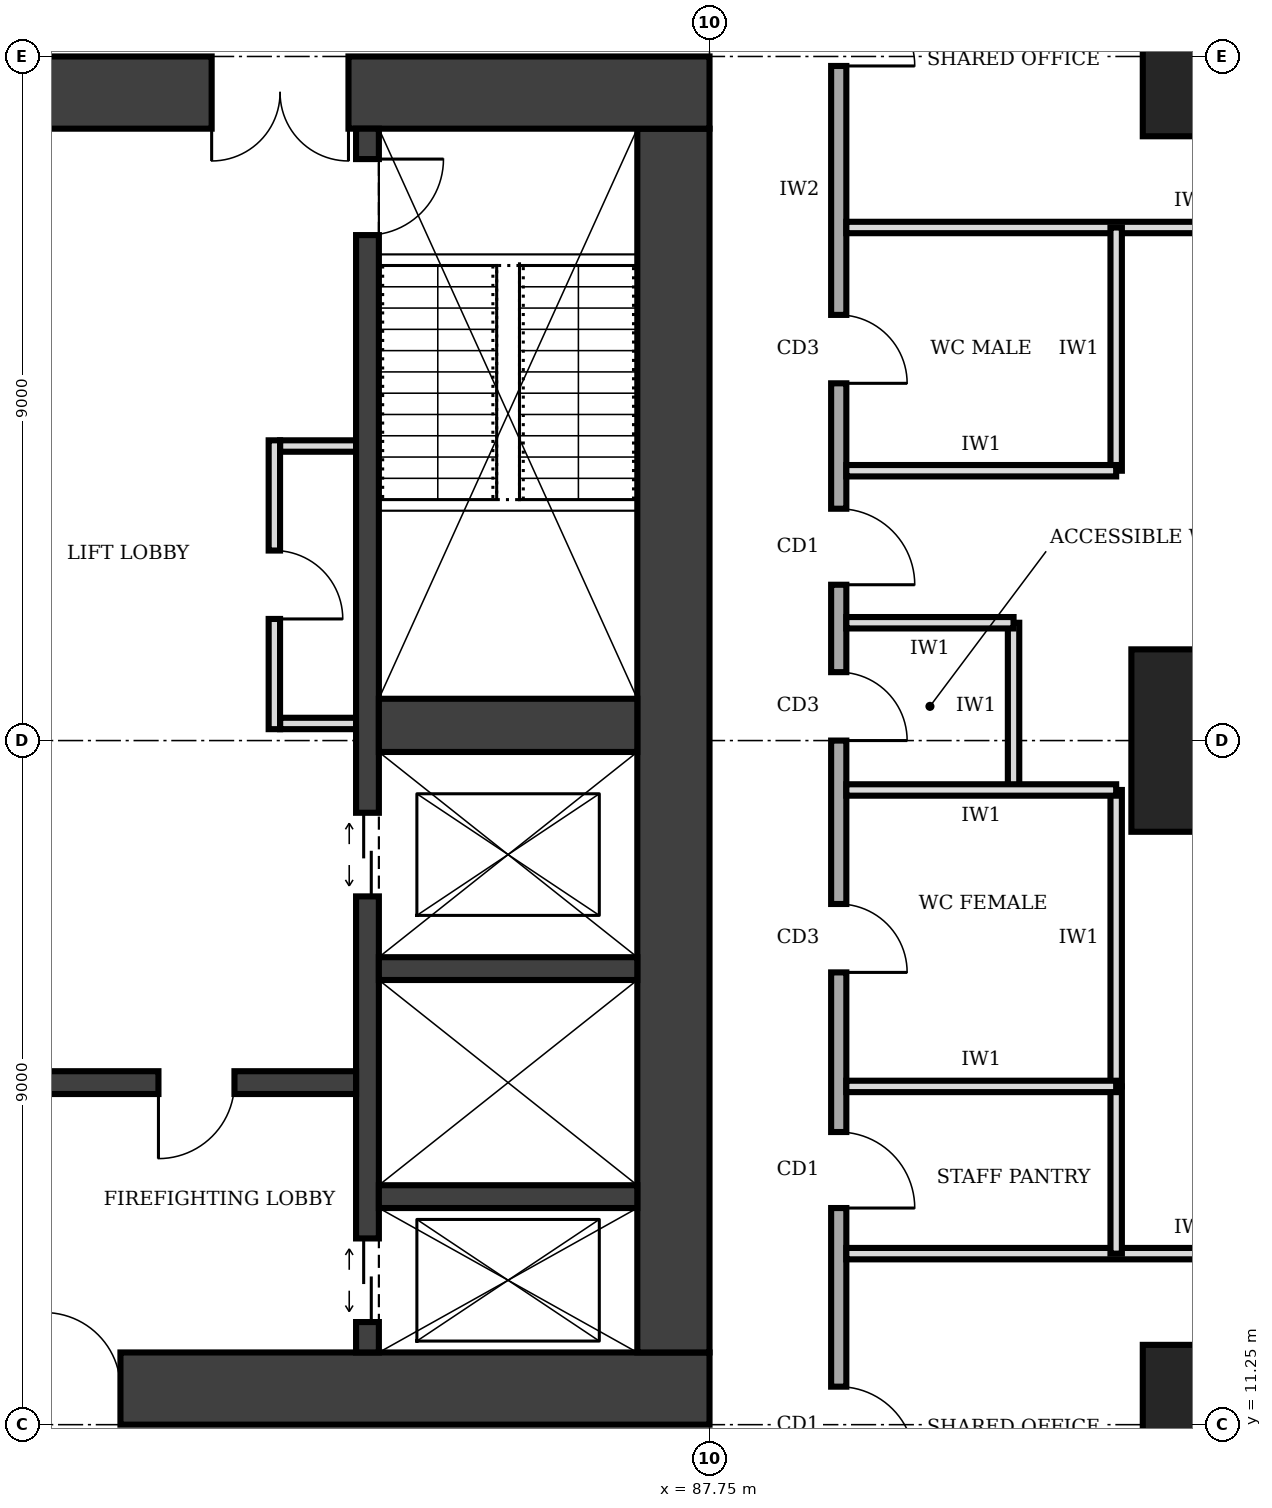
"""IFC4 building model, lengths in metres.
Left out: names, types, materials, properties, quantities, classifications, styles, units other than length and angle.
Written with IfcOpenShell. Run it as: python <this file> out.ifc"""

import sys

from ifc_helpers import new_model, si_unit, direction, frame, frame_2d, origin, origin_2d, place, context, subcontext, project, spatial, rectangle, extrude, element, fill, save


model = new_model("IFC4")
c1 = context("Model", 3, precision=1e-05, world=origin(), true_north=direction((0.0, 1.0)))
c2 = subcontext(c1, "Body", "Model", "MODEL_VIEW")
j1 = project(units=[si_unit("LENGTHUNIT", "METRE"), si_unit("PLANEANGLEUNIT", "RADIAN")], contexts=[c1])
p1 = place(None, origin())
s1 = spatial("IfcSite", under=j1, at=p1, CompositionType="ELEMENT")
p2 = place(p1, origin())
s2 = spatial("IfcBuilding", under=s1, at=p2, CompositionType="ELEMENT")
p3 = place(p2, frame((0.0, 0.0, 53.0)))
s3 = spatial("IfcBuildingStorey", under=s2, at=p3, CompositionType="ELEMENT", Elevation=53.0)
p4 = place(p3, frame((74.25, 11.725, 0.0), z_axis=(0.0, 0.0, 1.0), x_axis=(1.0, 0.0, 0.0)))
e1 = element("IfcWall", 1, at=p4, inside=s3, PredefinedType="SHEAR", context=c2, shape_type="SweptSolid", body=[
    extrude(rectangle(XDim=13.5, YDim=0.95, at=frame_2d((6.75, 0.0))), origin(), (0.0, 0.0, 1.0), 4.0),
])
p5 = place(p4, frame((4.75, 0.0, 0.0)))
e2 = element("IfcOpeningElement", 2, at=p5, cuts=e1, PredefinedType="OPENING", context=c2, shape_type="SweptSolid", body=[
    extrude(rectangle(XDim=1.0, YDim=2.1, at=frame_2d((0.5, 1.05))), frame((0.0, 0.485, 0.0), z_axis=(0.0, -1.0, 0.0), x_axis=(1.0, 0.0, 0.0)), (0.0, 0.0, 1.0), 0.97),
])
p6 = place(p3, frame((87.275, 12.2, 0.0), z_axis=(0.0, 0.0, 1.0), x_axis=(0.0, 1.0, 0.0)))
e3 = element("IfcWall", 3, at=p6, inside=s3, PredefinedType="SHEAR", context=c2, shape_type="SweptSolid", body=[
    extrude(rectangle(XDim=16.1, YDim=0.95, at=frame_2d((8.05, 0.0))), origin(), (0.0, 0.0, 1.0), 4.0),
])
p7 = place(p3, frame((87.75, 28.775, 0.0), z_axis=(0.0, 0.0, 1.0), x_axis=(-1.0, 0.0, 0.0)))
e4 = element("IfcWall", 4, at=p7, inside=s3, PredefinedType="SHEAR", context=c2, shape_type="SweptSolid", body=[
    extrude(rectangle(XDim=13.5, YDim=0.95, at=frame_2d((6.75, 0.0))), origin(), (0.0, 0.0, 1.0), 4.0),
])
p8 = place(p7, frame((4.75, 0.0, 0.0)))
e5 = element("IfcOpeningElement", 5, at=p8, cuts=e4, PredefinedType="OPENING", context=c2, shape_type="SweptSolid", body=[
    extrude(rectangle(XDim=1.8, YDim=2.1, at=frame_2d((0.9, 1.05))), frame((0.0, 0.485, 0.0), z_axis=(0.0, -1.0, 0.0), x_axis=(1.0, 0.0, 0.0)), (0.0, 0.0, 1.0), 0.97),
])
p9 = place(p3, frame((83.25, 12.2, 0.0), z_axis=(0.0, 0.0, 1.0), x_axis=(0.0, 1.0, 0.0)))
e6 = element("IfcWall", 6, at=p9, inside=s3, PredefinedType="SHEAR", context=c2, shape_type="SweptSolid", body=[
    extrude(rectangle(XDim=16.1, YDim=0.3, at=frame_2d((8.05, 0.0))), origin(), (0.0, 0.0, 1.0), 4.0),
])
p10 = place(p9, frame((14.7, 0.0, 0.0)))
e7 = element("IfcOpeningElement", 7, at=p10, cuts=e6, PredefinedType="OPENING", context=c2, shape_type="SweptSolid", body=[
    extrude(rectangle(XDim=1.0, YDim=2.1, at=frame_2d((0.5, 1.05))), frame((0.0, 0.16, 0.0), z_axis=(0.0, -1.0, 0.0), x_axis=(1.0, 0.0, 0.0)), (0.0, 0.0, 1.0), 0.32),
])
p11 = place(p9, frame((0.4, 0.0, 0.0)))
e8 = element("IfcOpeningElement", 8, at=p11, cuts=e6, PredefinedType="OPENING", context=c2, shape_type="SweptSolid", body=[
    extrude(rectangle(XDim=1.1, YDim=2.1, at=frame_2d((0.55, 1.05))), frame((0.0, 0.16, 0.0), z_axis=(0.0, -1.0, 0.0), x_axis=(1.0, 0.0, 0.0)), (0.0, 0.0, 1.0), 0.32),
])
p12 = place(p9, frame((6.0, 0.0, 0.0)))
e9 = element("IfcOpeningElement", 9, at=p12, cuts=e6, PredefinedType="OPENING", context=c2, shape_type="SweptSolid", body=[
    extrude(rectangle(XDim=1.1, YDim=2.1, at=frame_2d((0.55, 1.05))), frame((0.0, 0.16, 0.0), z_axis=(0.0, -1.0, 0.0), x_axis=(1.0, 0.0, 0.0)), (0.0, 0.0, 1.0), 0.32),
])
p13 = place(p3, frame((78.9, 15.75, 0.0), z_axis=(0.0, 0.0, 1.0), x_axis=(1.0, 0.0, 0.0)))
e10 = element("IfcWall", 10, at=p13, inside=s3, PredefinedType="SHEAR", context=c2, shape_type="SweptSolid", body=[
    extrude(rectangle(XDim=4.2, YDim=0.3, at=frame_2d((2.1, 0.0))), origin(), (0.0, 0.0, 1.0), 4.0),
])
p14 = place(p13, frame((1.6, 0.0, 0.0)))
e11 = element("IfcOpeningElement", 11, at=p14, cuts=e10, PredefinedType="OPENING", context=c2, shape_type="SweptSolid", body=[
    extrude(rectangle(XDim=1.0, YDim=2.1, at=frame_2d((0.5, 1.05))), frame((0.0, 0.16, 0.0), z_axis=(0.0, -1.0, 0.0), x_axis=(1.0, 0.0, 0.0)), (0.0, 0.0, 1.0), 0.32),
])
for number, where, z_axis, x_axis in (
    (12, (83.4, 14.25, 0.0), (0.0, 0.0, 1.0), (1.0, 0.0, 0.0)),
    (13, (83.4, 17.25, 0.0), (0.0, 0.0, 1.0), (1.0, 0.0, 0.0)),
):
    element("IfcWall", number, at=place(p3, frame(where, z_axis=z_axis, x_axis=x_axis)), inside=s3, PredefinedType="SHEAR", context=c2, shape_type="SweptSolid", body=[
        extrude(rectangle(XDim=3.4, YDim=0.3, at=frame_2d((1.7, 0.0))), origin(), (0.0, 0.0, 1.0), 4.0),
    ])
p15 = place(p3, frame((83.4, 20.45, 0.0), z_axis=(0.0, 0.0, 1.0), x_axis=(1.0, 0.0, 0.0)))
e14 = element("IfcWall", 14, at=p15, inside=s3, PredefinedType="SHEAR", context=c2, shape_type="SweptSolid", body=[
    extrude(rectangle(XDim=3.4, YDim=0.7, at=frame_2d((1.7, 0.0))), origin(), (0.0, 0.0, 1.0), 4.0),
])
p16 = place(p3, frame((94.5, 11.25, 0.0), z_axis=(0.0, 0.0, 1.0), x_axis=(1.0, 0.0, 0.0)))
e15 = element("IfcColumn", 15, at=p16, inside=s3, PredefinedType="COLUMN", context=c2, shape_type="SweptSolid", body=[
    extrude(rectangle(XDim=2.1, YDim=2.1, at=origin_2d()), origin(), (0.0, 0.0, 1.0), 4.0),
])
p17 = place(p3, frame((94.5, 20.25, 0.0), z_axis=(0.0, 0.0, 1.0), x_axis=(1.0, 0.0, 0.0)))
e16 = element("IfcColumn", 16, at=p17, inside=s3, PredefinedType="COLUMN", context=c2, shape_type="SweptSolid", body=[
    extrude(rectangle(XDim=2.4, YDim=2.4, at=origin_2d()), origin(), (0.0, 0.0, 1.0), 4.0),
])
p18 = place(p3, frame((94.5, 29.25, 0.0), z_axis=(0.0, 0.0, 1.0), x_axis=(1.0, 0.0, 0.0)))
e17 = element("IfcColumn", 17, at=p18, inside=s3, PredefinedType="COLUMN", context=c2, shape_type="SweptSolid", body=[
    extrude(rectangle(XDim=2.1, YDim=2.1, at=origin_2d()), origin(), (0.0, 0.0, 1.0), 4.0),
])
p19 = place(p3, frame((82.025, 20.4, 0.0), z_axis=(0.0, 0.0, 1.0), x_axis=(0.0, 1.0, 0.0)))
e18 = element("IfcWall", 18, at=p19, inside=s3, PredefinedType="PARTITIONING", context=c2, shape_type="SweptSolid", body=[
    extrude(rectangle(XDim=3.8, YDim=0.15, at=frame_2d((1.9, 0.0))), origin(), (0.0, 0.0, 1.0), 3.75),
])
p20 = place(p19, frame((1.45, 0.0, 0.0)))
e19 = element("IfcOpeningElement", 19, at=p20, cuts=e18, PredefinedType="OPENING", context=c2, shape_type="SweptSolid", body=[
    extrude(rectangle(XDim=0.9, YDim=2.1, at=frame_2d((0.45, 1.05))), frame((0.0, 0.085, 0.0), z_axis=(0.0, -1.0, 0.0), x_axis=(1.0, 0.0, 0.0)), (0.0, 0.0, 1.0), 0.17),
])
for number, where, z_axis, x_axis in (
    (20, (82.1, 20.475, 0.0), (0.0, 0.0, 1.0), (1.0, 0.0, 0.0)),
    (21, (82.1, 24.125, 0.0), (0.0, 0.0, 1.0), (1.0, 0.0, 0.0)),
):
    element("IfcWall", number, at=place(p3, frame(where, z_axis=z_axis, x_axis=x_axis)), inside=s3, PredefinedType="PARTITIONING", context=c2, shape_type="SweptSolid", body=[
        extrude(rectangle(XDim=1.0, YDim=0.15, at=frame_2d((0.5, 0.0))), origin(), (0.0, 0.0, 1.0), 3.75),
    ])
p21 = place(p3, frame((89.45, 9.2, 0.0), z_axis=(0.0, 0.0, 1.0), x_axis=(0.0, 1.0, 0.0)))
e22 = element("IfcWall", 22, at=p21, inside=s3, PredefinedType="SOLIDWALL", context=c2, shape_type="SweptSolid", body=[
    extrude(rectangle(XDim=23.05, YDim=0.2, at=frame_2d((11.525, 0.0))), origin(), (0.0, 0.0, 1.0), 3.75),
])
p22 = place(p21, frame((1.55, 0.0, 0.0)))
e23 = element("IfcOpeningElement", 23, at=p22, cuts=e22, PredefinedType="OPENING", context=c2, shape_type="SweptSolid", body=[
    extrude(rectangle(XDim=1.0, YDim=2.1, at=frame_2d((0.5, 1.05))), frame((0.0, 0.11, 0.0), z_axis=(0.0, -1.0, 0.0), x_axis=(1.0, 0.0, 0.0)), (0.0, 0.0, 1.0), 0.22),
])
p23 = place(p21, frame((4.9, 0.0, 0.0)))
e24 = element("IfcOpeningElement", 24, at=p23, cuts=e22, PredefinedType="OPENING", context=c2, shape_type="SweptSolid", body=[
    extrude(rectangle(XDim=1.0, YDim=2.1, at=frame_2d((0.5, 1.05))), frame((0.0, 0.11, 0.0), z_axis=(0.0, -1.0, 0.0), x_axis=(1.0, 0.0, 0.0)), (0.0, 0.0, 1.0), 0.22),
])
p24 = place(p21, frame((8.0, 0.0, 0.0)))
e25 = element("IfcOpeningElement", 25, at=p24, cuts=e22, PredefinedType="OPENING", context=c2, shape_type="SweptSolid", body=[
    extrude(rectangle(XDim=0.9, YDim=2.1, at=frame_2d((0.45, 1.05))), frame((0.0, 0.11, 0.0), z_axis=(0.0, -1.0, 0.0), x_axis=(1.0, 0.0, 0.0)), (0.0, 0.0, 1.0), 0.22),
])
p25 = place(p21, frame((11.05, 0.0, 0.0)))
e26 = element("IfcOpeningElement", 26, at=p25, cuts=e22, PredefinedType="OPENING", context=c2, shape_type="SweptSolid", body=[
    extrude(rectangle(XDim=0.9, YDim=2.1, at=frame_2d((0.45, 1.05))), frame((0.0, 0.11, 0.0), z_axis=(0.0, -1.0, 0.0), x_axis=(1.0, 0.0, 0.0)), (0.0, 0.0, 1.0), 0.22),
])
p26 = place(p21, frame((15.75, 0.0, 0.0)))
e27 = element("IfcOpeningElement", 27, at=p26, cuts=e22, PredefinedType="OPENING", context=c2, shape_type="SweptSolid", body=[
    extrude(rectangle(XDim=0.9, YDim=2.1, at=frame_2d((0.45, 1.05))), frame((0.0, 0.11, 0.0), z_axis=(0.0, -1.0, 0.0), x_axis=(1.0, 0.0, 0.0)), (0.0, 0.0, 1.0), 0.22),
])
p27 = place(p21, frame((13.1, 0.0, 0.0)))
e28 = element("IfcOpeningElement", 28, at=p27, cuts=e22, PredefinedType="OPENING", context=c2, shape_type="SweptSolid", body=[
    extrude(rectangle(XDim=1.0, YDim=2.1, at=frame_2d((0.5, 1.05))), frame((0.0, 0.11, 0.0), z_axis=(0.0, -1.0, 0.0), x_axis=(1.0, 0.0, 0.0)), (0.0, 0.0, 1.0), 0.22),
])
p28 = place(p21, frame((19.925, 0.0, 0.0)))
e29 = element("IfcOpeningElement", 29, at=p28, cuts=e22, PredefinedType="OPENING", context=c2, shape_type="SweptSolid", body=[
    extrude(rectangle(XDim=1.0, YDim=2.1, at=frame_2d((0.5, 1.05))), frame((0.0, 0.11, 0.0), z_axis=(0.0, -1.0, 0.0), x_axis=(1.0, 0.0, 0.0)), (0.0, 0.0, 1.0), 0.22),
])
for number, where, z_axis, x_axis in (
    (30, (89.55, 13.5, 0.0), (0.0, 0.0, 1.0), (1.0, 0.0, 0.0)),
    (31, (89.55, 27.0, 0.0), (0.0, 0.0, 1.0), (1.0, 0.0, 0.0)),
):
    element("IfcWall", number, at=place(p3, frame(where, z_axis=z_axis, x_axis=x_axis)), inside=s3, PredefinedType="PARTITIONING", context=c2, shape_type="SweptSolid", body=[
        extrude(rectangle(XDim=9.15, YDim=0.15, at=frame_2d((4.575, 0.0))), origin(), (0.0, 0.0, 1.0), 3.75),
    ])
p29 = place(p3, frame((89.55, 15.7, 0.0), z_axis=(0.0, 0.0, 1.0), x_axis=(1.0, 0.0, 0.0)))
e32 = element("IfcWall", 32, at=p29, inside=s3, PredefinedType="PARTITIONING", context=c2, shape_type="SweptSolid", body=[
    extrude(rectangle(XDim=3.55, YDim=0.15, at=frame_2d((1.775, 0.0))), origin(), (0.0, 0.0, 1.0), 3.75),
])
p30 = place(p3, frame((89.55, 19.6, 0.0), z_axis=(0.0, 0.0, 1.0), x_axis=(1.0, 0.0, 0.0)))
e33 = element("IfcWall", 33, at=p30, inside=s3, PredefinedType="PARTITIONING", context=c2, shape_type="SweptSolid", body=[
    extrude(rectangle(XDim=3.55, YDim=0.15, at=frame_2d((1.775, 0.0))), origin(), (0.0, 0.0, 1.0), 2.85),
])
p31 = place(p3, frame((89.55, 21.8, 0.0), z_axis=(0.0, 0.0, 1.0), x_axis=(1.0, 0.0, 0.0)))
e34 = element("IfcWall", 34, at=p31, inside=s3, PredefinedType="PARTITIONING", context=c2, shape_type="SweptSolid", body=[
    extrude(rectangle(XDim=2.2, YDim=0.15, at=frame_2d((1.1, 0.0))), origin(), (0.0, 0.0, 1.0), 3.75),
])
p32 = place(p3, frame((89.55, 23.8, 0.0), z_axis=(0.0, 0.0, 1.0), x_axis=(1.0, 0.0, 0.0)))
e35 = element("IfcWall", 35, at=p32, inside=s3, PredefinedType="PARTITIONING", context=c2, shape_type="SweptSolid", body=[
    extrude(rectangle(XDim=3.55, YDim=0.15, at=frame_2d((1.775, 0.0))), origin(), (0.0, 0.0, 1.0), 3.75),
])
p33 = place(p3, frame((93.1, 13.5, 0.0), z_axis=(0.0, 0.0, 1.0), x_axis=(0.0, 1.0, 0.0)))
e36 = element("IfcWall", 36, at=p33, inside=s3, PredefinedType="PARTITIONING", context=c2, shape_type="SweptSolid", body=[
    extrude(rectangle(XDim=2.2, YDim=0.15, at=frame_2d((1.1, 0.0))), origin(), (0.0, 0.0, 1.0), 3.75),
])
p34 = place(p3, frame((93.1, 15.7, 0.0), z_axis=(0.0, 0.0, 1.0), x_axis=(0.0, 1.0, 0.0)))
e37 = element("IfcWall", 37, at=p34, inside=s3, PredefinedType="PARTITIONING", context=c2, shape_type="SweptSolid", body=[
    extrude(rectangle(XDim=3.9, YDim=0.15, at=frame_2d((1.95, 0.0))), origin(), (0.0, 0.0, 1.0), 3.75),
])
p35 = place(p3, frame((91.75, 19.6, 0.0), z_axis=(0.0, 0.0, 1.0), x_axis=(0.0, 1.0, 0.0)))
e38 = element("IfcWall", 38, at=p35, inside=s3, PredefinedType="PARTITIONING", context=c2, shape_type="SweptSolid", body=[
    extrude(rectangle(XDim=2.2, YDim=0.15, at=frame_2d((1.1, 0.0))), origin(), (0.0, 0.0, 1.0), 3.75),
])
p36 = place(p3, frame((93.1, 23.8, 0.0), z_axis=(0.0, 0.0, 1.0), x_axis=(0.0, 1.0, 0.0)))
e39 = element("IfcWall", 39, at=p36, inside=s3, PredefinedType="PARTITIONING", context=c2, shape_type="SweptSolid", body=[
    extrude(rectangle(XDim=3.2, YDim=0.15, at=frame_2d((1.6, 0.0))), origin(), (0.0, 0.0, 1.0), 3.75),
])
p37 = place(p5, origin())
e40 = element("IfcDoor", 40, at=p37, inside=s3, OperationType="SINGLE_SWING_LEFT", PredefinedType="DOOR", context=c2, shape_type="SweptSolid", body=[
    extrude(rectangle(XDim=1.0, YDim=2.1, at=frame_2d((0.5, 1.05))), frame((0.0, 0.025, 0.0), z_axis=(0.0, -1.0, 0.0), x_axis=(1.0, 0.0, 0.0)), (0.0, 0.0, 1.0), 0.05),
])
fill(e2, e40)
p38 = place(p8, origin())
e41 = element("IfcDoor", 41, at=p38, inside=s3, OperationType="DOUBLE_DOOR_SINGLE_SWING", PredefinedType="DOOR", context=c2, shape_type="SweptSolid", body=[
    extrude(rectangle(XDim=1.8, YDim=2.1, at=frame_2d((0.9, 1.05))), frame((0.0, 0.025, 0.0), z_axis=(0.0, -1.0, 0.0), x_axis=(1.0, 0.0, 0.0)), (0.0, 0.0, 1.0), 0.05),
])
fill(e5, e41)
p39 = place(p14, frame((1.0, 0.0, 0.0), z_axis=(0.0, 0.0, 1.0), x_axis=(-1.0, 0.0, 0.0)))
e42 = element("IfcDoor", 42, at=p39, inside=s3, OperationType="SINGLE_SWING_RIGHT", PredefinedType="DOOR", context=c2, shape_type="SweptSolid", body=[
    extrude(rectangle(XDim=1.0, YDim=2.1, at=frame_2d((0.5, 1.05))), frame((0.0, 0.025, 0.0), z_axis=(0.0, -1.0, 0.0), x_axis=(1.0, 0.0, 0.0)), (0.0, 0.0, 1.0), 0.05),
])
fill(e11, e42)
p40 = place(p10, frame((1.0, 0.0, 0.0), z_axis=(0.0, 0.0, 1.0), x_axis=(-1.0, 0.0, 0.0)))
e43 = element("IfcDoor", 43, at=p40, inside=s3, OperationType="SINGLE_SWING_LEFT", PredefinedType="DOOR", context=c2, shape_type="SweptSolid", body=[
    extrude(rectangle(XDim=1.0, YDim=2.1, at=frame_2d((0.5, 1.05))), frame((0.0, 0.025, 0.0), z_axis=(0.0, -1.0, 0.0), x_axis=(1.0, 0.0, 0.0)), (0.0, 0.0, 1.0), 0.05),
])
fill(e7, e43)
p41 = place(p11, origin())
e44 = element("IfcDoor", 44, at=p41, inside=s3, OperationType="DOUBLE_DOOR_SLIDING", PredefinedType="DOOR", context=c2, shape_type="SweptSolid", body=[
    extrude(rectangle(XDim=1.1, YDim=2.1, at=frame_2d((0.55, 1.05))), frame((0.0, 0.025, 0.0), z_axis=(0.0, -1.0, 0.0), x_axis=(1.0, 0.0, 0.0)), (0.0, 0.0, 1.0), 0.05),
])
fill(e8, e44)
p42 = place(p12, origin())
e45 = element("IfcDoor", 45, at=p42, inside=s3, OperationType="DOUBLE_DOOR_SLIDING", PredefinedType="DOOR", context=c2, shape_type="SweptSolid", body=[
    extrude(rectangle(XDim=1.1, YDim=2.1, at=frame_2d((0.55, 1.05))), frame((0.0, 0.025, 0.0), z_axis=(0.0, -1.0, 0.0), x_axis=(1.0, 0.0, 0.0)), (0.0, 0.0, 1.0), 0.05),
])
fill(e9, e45)
p43 = place(p20, frame((0.9, 0.0, 0.0), z_axis=(0.0, 0.0, 1.0), x_axis=(-1.0, 0.0, 0.0)))
e46 = element("IfcDoor", 46, at=p43, inside=s3, OperationType="SINGLE_SWING_RIGHT", PredefinedType="DOOR", context=c2, shape_type="SweptSolid", body=[
    extrude(rectangle(XDim=0.9, YDim=2.1, at=frame_2d((0.45, 1.05))), frame((0.0, 0.025, 0.0), z_axis=(0.0, -1.0, 0.0), x_axis=(1.0, 0.0, 0.0)), (0.0, 0.0, 1.0), 0.05),
])
fill(e19, e46)
p44 = place(p22, frame((1.0, 0.0, 0.0), z_axis=(0.0, 0.0, 1.0), x_axis=(-1.0, 0.0, 0.0)))
e47 = element("IfcDoor", 47, at=p44, inside=s3, OperationType="SINGLE_SWING_RIGHT", PredefinedType="DOOR", context=c2, shape_type="SweptSolid", body=[
    extrude(rectangle(XDim=1.0, YDim=2.1, at=frame_2d((0.5, 1.05))), frame((0.0, 0.025, 0.0), z_axis=(0.0, -1.0, 0.0), x_axis=(1.0, 0.0, 0.0)), (0.0, 0.0, 1.0), 0.05),
])
fill(e23, e47)
p45 = place(p23, frame((1.0, 0.0, 0.0), z_axis=(0.0, 0.0, 1.0), x_axis=(-1.0, 0.0, 0.0)))
e48 = element("IfcDoor", 48, at=p45, inside=s3, OperationType="SINGLE_SWING_RIGHT", PredefinedType="DOOR", context=c2, shape_type="SweptSolid", body=[
    extrude(rectangle(XDim=1.0, YDim=2.1, at=frame_2d((0.5, 1.05))), frame((0.0, 0.025, 0.0), z_axis=(0.0, -1.0, 0.0), x_axis=(1.0, 0.0, 0.0)), (0.0, 0.0, 1.0), 0.05),
])
fill(e24, e48)
p46 = place(p24, frame((0.9, 0.0, 0.0), z_axis=(0.0, 0.0, 1.0), x_axis=(-1.0, 0.0, 0.0)))
e49 = element("IfcDoor", 49, at=p46, inside=s3, OperationType="SINGLE_SWING_RIGHT", PredefinedType="DOOR", context=c2, shape_type="SweptSolid", body=[
    extrude(rectangle(XDim=0.9, YDim=2.1, at=frame_2d((0.45, 1.05))), frame((0.0, 0.025, 0.0), z_axis=(0.0, -1.0, 0.0), x_axis=(1.0, 0.0, 0.0)), (0.0, 0.0, 1.0), 0.05),
])
fill(e25, e49)
p47 = place(p25, frame((0.9, 0.0, 0.0), z_axis=(0.0, 0.0, 1.0), x_axis=(-1.0, 0.0, 0.0)))
e50 = element("IfcDoor", 50, at=p47, inside=s3, OperationType="SINGLE_SWING_RIGHT", PredefinedType="DOOR", context=c2, shape_type="SweptSolid", body=[
    extrude(rectangle(XDim=0.9, YDim=2.1, at=frame_2d((0.45, 1.05))), frame((0.0, 0.025, 0.0), z_axis=(0.0, -1.0, 0.0), x_axis=(1.0, 0.0, 0.0)), (0.0, 0.0, 1.0), 0.05),
])
fill(e26, e50)
p48 = place(p26, frame((0.9, 0.0, 0.0), z_axis=(0.0, 0.0, 1.0), x_axis=(-1.0, 0.0, 0.0)))
e51 = element("IfcDoor", 51, at=p48, inside=s3, OperationType="SINGLE_SWING_RIGHT", PredefinedType="DOOR", context=c2, shape_type="SweptSolid", body=[
    extrude(rectangle(XDim=0.9, YDim=2.1, at=frame_2d((0.45, 1.05))), frame((0.0, 0.025, 0.0), z_axis=(0.0, -1.0, 0.0), x_axis=(1.0, 0.0, 0.0)), (0.0, 0.0, 1.0), 0.05),
])
fill(e27, e51)
p49 = place(p27, frame((1.0, 0.0, 0.0), z_axis=(0.0, 0.0, 1.0), x_axis=(-1.0, 0.0, 0.0)))
e52 = element("IfcDoor", 52, at=p49, inside=s3, OperationType="SINGLE_SWING_RIGHT", PredefinedType="DOOR", context=c2, shape_type="SweptSolid", body=[
    extrude(rectangle(XDim=1.0, YDim=2.1, at=frame_2d((0.5, 1.05))), frame((0.0, 0.025, 0.0), z_axis=(0.0, -1.0, 0.0), x_axis=(1.0, 0.0, 0.0)), (0.0, 0.0, 1.0), 0.05),
])
fill(e28, e52)
p50 = place(p28, frame((1.0, 0.0, 0.0), z_axis=(0.0, 0.0, 1.0), x_axis=(-1.0, 0.0, 0.0)))
e53 = element("IfcDoor", 53, at=p50, inside=s3, OperationType="SINGLE_SWING_RIGHT", PredefinedType="DOOR", context=c2, shape_type="SweptSolid", body=[
    extrude(rectangle(XDim=1.0, YDim=2.1, at=frame_2d((0.5, 1.05))), frame((0.0, 0.025, 0.0), z_axis=(0.0, -1.0, 0.0), x_axis=(1.0, 0.0, 0.0)), (0.0, 0.0, 1.0), 0.05),
])
fill(e29, e53)
save(model, sys.argv[1])
